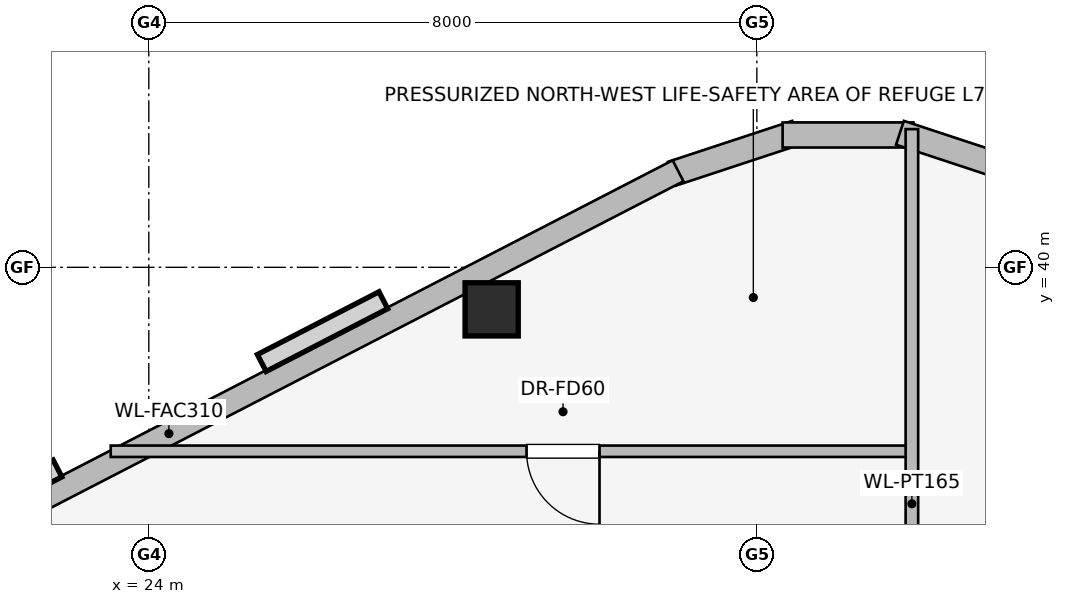
"""IFC4 building model, lengths in metres.
Left out: names, types, materials, properties, quantities, classifications, styles, units other than length and angle.
Written with IfcOpenShell. Run it as: python <this file> out.ifc"""

import sys

from ifc_helpers import new_model, si_unit, direction, frame, frame_2d, origin, origin_2d, place, context, subcontext, project, spatial, rectangle, extrude, element, fill, save


model = new_model("IFC4")
c1 = context("Model", 3, precision=1e-05, world=origin(), true_north=direction((0.0, 1.0)))
c2 = subcontext(c1, "Body", "Model", "MODEL_VIEW")
j1 = project(units=[si_unit("LENGTHUNIT", "METRE"), si_unit("PLANEANGLEUNIT", "RADIAN")], contexts=[c1])
p1 = place(None, origin())
s1 = spatial("IfcSite", under=j1, at=p1, CompositionType="ELEMENT")
p2 = place(p1, origin())
s2 = spatial("IfcBuilding", under=s1, at=p2, CompositionType="ELEMENT")
p3 = place(p2, frame((0.0, 0.0, 279.9)))
s3 = spatial("IfcBuildingStorey", under=s2, at=p3, CompositionType="ELEMENT", Elevation=279.9)
p4 = place(p3, frame((28.511, 39.447, 0.0), z_axis=(0.0, 0.0, 1.0), x_axis=(1.0, 0.0, 0.0)))
e1 = element("IfcColumn", 1, at=p4, inside=s3, PredefinedType="COLUMN", context=c2, shape_type="SweptSolid", body=[
    extrude(rectangle(XDim=0.7, YDim=0.7, at=origin_2d()), origin(), (0.0, 0.0, 1.0), 5.2),
])
p5 = place(p3, frame((30.882, 41.231, 0.0), z_axis=(0.0, 0.0, 1.0), x_axis=(0.949713440491, 0.313120393699, 0.0)))
e2 = element("IfcWall", 2, at=p5, inside=s3, PredefinedType="STANDARD", context=c2, shape_type="SweptSolid", body=[
    extrude(rectangle(XDim=1.722, YDim=0.33, at=frame_2d((0.861, 0.0))), origin(), (0.0, 0.0, 1.0), 4.89),
])
p6 = place(p3, frame((32.339, 41.741, 0.0), z_axis=(0.0, 0.0, 1.0), x_axis=(1.0, 0.0, 0.0)))
e3 = element("IfcWall", 3, at=p6, inside=s3, PredefinedType="STANDARD", context=c2, shape_type="SweptSolid", body=[
    extrude(rectangle(XDim=1.722, YDim=0.33, at=frame_2d((0.861, 0.0))), origin(), (0.0, 0.0, 1.0), 4.89),
])
p7 = place(p3, frame((33.883, 41.77, 0.0), z_axis=(0.0, 0.0, 1.0), x_axis=(0.949713440491, -0.313120393699, 0.0)))
e4 = element("IfcWall", 4, at=p7, inside=s3, PredefinedType="STANDARD", context=c2, shape_type="SweptSolid", body=[
    extrude(rectangle(XDim=1.722, YDim=0.33, at=frame_2d((0.861, 0.0))), origin(), (0.0, 0.0, 1.0), 4.89),
])
p8 = place(p3, frame((17.566, 34.354, 0.0), z_axis=(0.0, 0.0, 1.0), x_axis=(0.888581481622, 0.458718814218, 0.0)))
e5 = element("IfcWall", 5, at=p8, inside=s3, PredefinedType="STANDARD", context=c2, shape_type="SweptSolid", body=[
    extrude(rectangle(XDim=15.077, YDim=0.31, at=frame_2d((7.539, 0.0))), origin(), (0.0, 0.0, 1.0), 4.89),
])
p9 = place(p3, frame((34.0, 37.58, 0.0), z_axis=(0.0, 0.0, 1.0), x_axis=(-1.0, 0.0, 0.0)))
e6 = element("IfcWall", 6, at=p9, inside=s3, PredefinedType="PARTITIONING", context=c2, shape_type="SweptSolid", body=[
    extrude(rectangle(XDim=10.501, YDim=0.15, at=frame_2d((5.25, 0.0))), origin(), (0.0, 0.0, 1.0), 4.89),
])
p10 = place(p9, frame((4.07, 0.0, 0.0)))
e7 = element("IfcOpeningElement", 7, at=p10, cuts=e6, PredefinedType="OPENING", context=c2, shape_type="SweptSolid", body=[
    extrude(rectangle(XDim=0.96, YDim=2.0, at=frame_2d((0.48, 1.0))), frame((0.0, 0.085, 0.0), z_axis=(0.0, -1.0, 0.0), x_axis=(1.0, 0.0, 0.0)), (0.0, 0.0, 1.0), 0.17),
])
p11 = place(p3, frame((34.04, 31.96, 0.0), z_axis=(0.0, 0.0, 1.0), x_axis=(0.0, 1.0, 0.0)))
e8 = element("IfcWall", 8, at=p11, inside=s3, PredefinedType="PARTITIONING", context=c2, shape_type="SweptSolid", body=[
    extrude(rectangle(XDim=9.858, YDim=0.165, at=frame_2d((4.929, 0.0))), origin(), (0.0, 0.0, 1.0), 4.89),
])
p12 = place(p10, origin())
e9 = element("IfcDoor", 9, at=p12, inside=s3, OperationType="SINGLE_SWING_LEFT", PredefinedType="DOOR", context=c2, shape_type="SweptSolid", body=[
    extrude(rectangle(XDim=0.96, YDim=2.0, at=frame_2d((0.48, 1.0))), frame((0.0, 0.025, 0.0), z_axis=(0.0, -1.0, 0.0), x_axis=(1.0, 0.0, 0.0)), (0.0, 0.0, 1.0), 0.05),
])
fill(e7, e9)
save(model, sys.argv[1])
